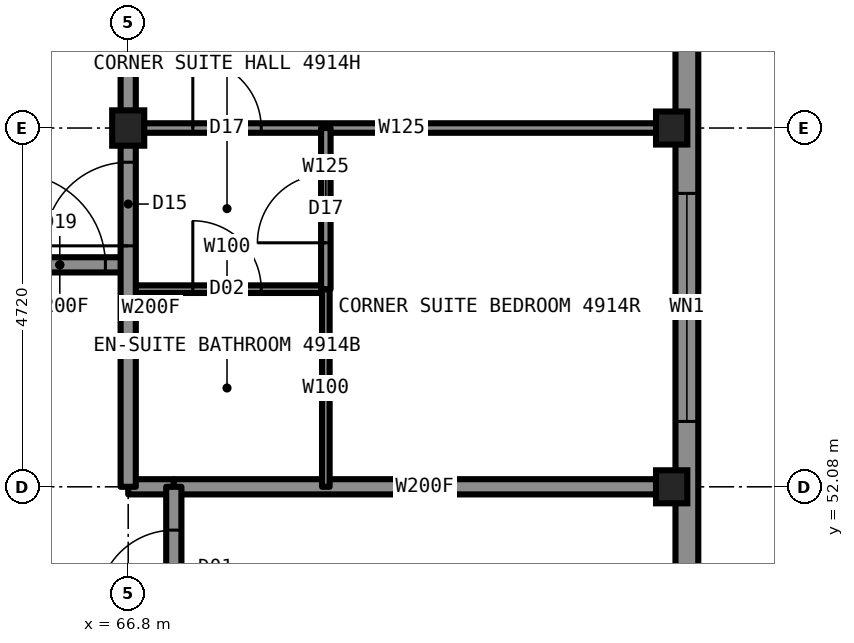
"""IFC4 building model, lengths in metres.
Left out: names, types, materials, properties, quantities, classifications, styles, units other than length and angle.
Written with IfcOpenShell. Run it as: python <this file> out.ifc"""

import sys

from ifc_helpers import new_model, si_unit, direction, frame, frame_2d, origin, origin_2d, place, context, subcontext, project, spatial, rectangle, i_section, extrude, element, fill, save


model = new_model("IFC4")
c1 = context("Model", 3, precision=1e-05, world=origin(), true_north=direction((0.0, 1.0)))
c2 = subcontext(c1, "Body", "Model", "MODEL_VIEW")
j1 = project(units=[si_unit("LENGTHUNIT", "METRE"), si_unit("PLANEANGLEUNIT", "RADIAN")], contexts=[c1])
p1 = place(None, origin())
s1 = spatial("IfcSite", under=j1, at=p1, CompositionType="ELEMENT")
p2 = place(p1, origin())
s2 = spatial("IfcBuilding", under=s1, at=p2, CompositionType="ELEMENT")
p3 = place(p2, frame((0.0, 0.0, 182.8)))
s3 = spatial("IfcBuildingStorey", under=s2, at=p3, CompositionType="ELEMENT", Elevation=182.8)
for number, where, z_axis, x_axis in (
    (1, (73.95, 52.08, 0.0), (0.0, 0.0, 1.0), (1.0, 0.0, 0.0)),
    (2, (73.95, 56.8, 0.0), (0.0, 0.0, 1.0), (1.0, 0.0, 0.0)),
):
    element("IfcColumn", number, at=place(p3, frame(where, z_axis=z_axis, x_axis=x_axis)), inside=s3, PredefinedType="COLUMN", context=c2, shape_type="SweptSolid", body=[
        extrude(i_section(OverallWidth=0.411, OverallDepth=0.434, WebThickness=0.036, FlangeThickness=0.057, at=origin_2d()), origin(), (0.0, 0.0, 1.0), 3.5),
    ])
p4 = place(p3, frame((66.8, 56.8, 0.0), z_axis=(0.0, 0.0, 1.0), x_axis=(1.0, 0.0, 0.0)))
e3 = element("IfcColumn", 3, at=p4, inside=s3, PredefinedType="COLUMN", context=c2, shape_type="SweptSolid", body=[
    extrude(i_section(OverallWidth=0.422, OverallDepth=0.465, WebThickness=0.045, FlangeThickness=0.073, at=origin_2d()), origin(), (0.0, 0.0, 1.0), 3.5),
])
p5 = place(p3, frame((65.0, 55.0, 0.0), z_axis=(0.0, 0.0, 1.0), x_axis=(1.0, 0.0, 0.0)))
e4 = element("IfcWall", 4, at=p5, inside=s3, PredefinedType="PARTITIONING", context=c2, shape_type="SweptSolid", body=[
    extrude(rectangle(XDim=1.8, YDim=0.2, at=frame_2d((0.9, 0.0))), origin(), (0.0, 0.0, 1.0), 3.33),
])
p6 = place(p5, frame((0.3, 0.0, 0.0)))
e5 = element("IfcOpeningElement", 5, at=p6, cuts=e4, PredefinedType="OPENING", context=c2, shape_type="SweptSolid", body=[
    extrude(rectangle(XDim=1.2, YDim=2.2, at=frame_2d((0.6, 1.1))), frame((0.0, 0.11, 0.0), z_axis=(0.0, -1.0, 0.0), x_axis=(1.0, 0.0, 0.0)), (0.0, 0.0, 1.0), 0.22),
])
p7 = place(p3, frame((66.8, 56.8, 0.0), z_axis=(0.0, 0.0, 1.0), x_axis=(1.0, 0.0, 0.0)))
e6 = element("IfcWall", 6, at=p7, inside=s3, PredefinedType="PARTITIONING", context=c2, shape_type="SweptSolid", body=[
    extrude(rectangle(XDim=7.2, YDim=0.125, at=frame_2d((3.6, 0.0))), origin(), (0.0, 0.0, 1.0), 2.573),
])
p8 = place(p7, frame((0.85, 0.0, 0.0)))
e7 = element("IfcOpeningElement", 7, at=p8, cuts=e6, PredefinedType="OPENING", context=c2, shape_type="SweptSolid", body=[
    extrude(rectangle(XDim=0.9, YDim=2.2, at=frame_2d((0.45, 1.1))), frame((0.0, 0.073, 0.0), z_axis=(0.0, -1.0, 0.0), x_axis=(1.0, 0.0, 0.0)), (0.0, 0.0, 1.0), 0.145),
])
p9 = place(p3, frame((66.8, 52.08, 0.0), z_axis=(0.0, 0.0, 1.0), x_axis=(1.0, 0.0, 0.0)))
e8 = element("IfcWall", 8, at=p9, inside=s3, PredefinedType="PARTITIONING", context=c2, shape_type="SweptSolid", body=[
    extrude(rectangle(XDim=0.6, YDim=0.2, at=frame_2d((0.3, 0.0))), origin(), (0.0, 0.0, 1.0), 2.573),
])
p10 = place(p3, frame((67.4, 52.08, 0.0), z_axis=(0.0, 0.0, 1.0), x_axis=(1.0, 0.0, 0.0)))
e9 = element("IfcWall", 9, at=p10, inside=s3, PredefinedType="PARTITIONING", context=c2, shape_type="SweptSolid", body=[
    extrude(rectangle(XDim=6.6, YDim=0.2, at=frame_2d((3.3, 0.0))), origin(), (0.0, 0.0, 1.0), 2.573),
])
p11 = place(p3, frame((66.8, 54.68, 0.0), z_axis=(0.0, 0.0, 1.0), x_axis=(1.0, 0.0, 0.0)))
e10 = element("IfcWall", 10, at=p11, inside=s3, PredefinedType="PARTITIONING", context=c2, shape_type="SweptSolid", body=[
    extrude(rectangle(XDim=2.6, YDim=0.1, at=frame_2d((1.3, 0.0))), origin(), (0.0, 0.0, 1.0), 3.33),
])
p12 = place(p11, frame((0.85, 0.0, 0.0)))
e11 = element("IfcOpeningElement", 11, at=p12, cuts=e10, PredefinedType="OPENING", context=c2, shape_type="SweptSolid", body=[
    extrude(rectangle(XDim=0.9, YDim=2.1, at=frame_2d((0.45, 1.05))), frame((0.0, 0.06, 0.0), z_axis=(0.0, -1.0, 0.0), x_axis=(1.0, 0.0, 0.0)), (0.0, 0.0, 1.0), 0.12),
])
p13 = place(p3, frame((66.8, 52.08, 0.0), z_axis=(0.0, 0.0, 1.0), x_axis=(0.0, 1.0, 0.0)))
e12 = element("IfcWall", 12, at=p13, inside=s3, PredefinedType="PARTITIONING", context=c2, shape_type="SweptSolid", body=[
    extrude(rectangle(XDim=4.7, YDim=0.2, at=frame_2d((2.35, 0.0))), origin(), (0.0, 0.0, 1.0), 3.33),
])
p14 = place(p13, frame((3.17, 0.0, 0.0)))
e13 = element("IfcOpeningElement", 13, at=p14, cuts=e12, PredefinedType="OPENING", context=c2, shape_type="SweptSolid", body=[
    extrude(rectangle(XDim=1.1, YDim=2.2, at=frame_2d((0.55, 1.1))), frame((0.0, 0.11, 0.0), z_axis=(0.0, -1.0, 0.0), x_axis=(1.0, 0.0, 0.0)), (0.0, 0.0, 1.0), 0.22),
])
p15 = place(p3, frame((67.4, 37.92, 0.0), z_axis=(0.0, 0.0, 1.0), x_axis=(0.0, 1.0, 0.0)))
e14 = element("IfcWall", 14, at=p15, inside=s3, PredefinedType="PARTITIONING", context=c2, shape_type="SweptSolid", body=[
    extrude(rectangle(XDim=14.16, YDim=0.2, at=frame_2d((7.08, 0.0))), origin(), (0.0, 0.0, 1.0), 3.33),
])
p16 = place(p15, frame((3.0, 0.0, 0.0)))
e15 = element("IfcOpeningElement", 15, at=p16, cuts=e14, PredefinedType="OPENING", context=c2, shape_type="SweptSolid", body=[
    extrude(rectangle(XDim=1.0, YDim=2.2, at=frame_2d((0.5, 1.1))), frame((0.0, 0.11, 0.0), z_axis=(0.0, -1.0, 0.0), x_axis=(1.0, 0.0, 0.0)), (0.0, 0.0, 1.0), 0.22),
])
p17 = place(p15, frame((12.59, 0.0, 0.0)))
e16 = element("IfcOpeningElement", 16, at=p17, cuts=e14, PredefinedType="OPENING", context=c2, shape_type="SweptSolid", body=[
    extrude(rectangle(XDim=1.0, YDim=2.2, at=frame_2d((0.5, 1.1))), frame((0.0, 0.11, 0.0), z_axis=(0.0, -1.0, 0.0), x_axis=(1.0, 0.0, 0.0)), (0.0, 0.0, 1.0), 0.22),
])
p18 = place(p3, frame((69.4, 52.08, 0.0), z_axis=(0.0, 0.0, 1.0), x_axis=(0.0, 1.0, 0.0)))
e17 = element("IfcWall", 17, at=p18, inside=s3, PredefinedType="PARTITIONING", context=c2, shape_type="SweptSolid", body=[
    extrude(rectangle(XDim=2.6, YDim=0.1, at=frame_2d((1.3, 0.0))), origin(), (0.0, 0.0, 1.0), 3.33),
])
p19 = place(p3, frame((69.4, 54.68, 0.0), z_axis=(0.0, 0.0, 1.0), x_axis=(0.0, 1.0, 0.0)))
e18 = element("IfcWall", 18, at=p19, inside=s3, PredefinedType="PARTITIONING", context=c2, shape_type="SweptSolid", body=[
    extrude(rectangle(XDim=2.12, YDim=0.125, at=frame_2d((1.06, 0.0))), origin(), (0.0, 0.0, 1.0), 3.33),
])
p20 = place(p19, frame((0.61, 0.0, 0.0)))
e19 = element("IfcOpeningElement", 19, at=p20, cuts=e18, PredefinedType="OPENING", context=c2, shape_type="SweptSolid", body=[
    extrude(rectangle(XDim=0.9, YDim=2.2, at=frame_2d((0.45, 1.1))), frame((0.0, 0.073, 0.0), z_axis=(0.0, -1.0, 0.0), x_axis=(1.0, 0.0, 0.0)), (0.0, 0.0, 1.0), 0.145),
])
p21 = place(p3, frame((74.15, 31.2, 0.0), z_axis=(0.0, 0.0, 1.0), x_axis=(0.0, 1.0, 0.0)))
e20 = element("IfcWall", 20, at=p21, inside=s3, PredefinedType="SOLIDWALL", context=c2, shape_type="SweptSolid", body=[
    extrude(rectangle(XDim=27.6, YDim=0.3, at=frame_2d((13.8, 0.0))), origin(), (0.0, 0.0, 1.0), 2.83),
])
p22 = place(p21, frame((2.86, 0.0, 0.3)))
e21 = element("IfcOpeningElement", 21, at=p22, cuts=e20, PredefinedType="OPENING", context=c2, shape_type="SweptSolid", body=[
    extrude(rectangle(XDim=3.0, YDim=2.0, at=frame_2d((1.5, 1.0))), frame((0.0, 0.16, 0.0), z_axis=(0.0, -1.0, 0.0), x_axis=(1.0, 0.0, 0.0)), (0.0, 0.0, 1.0), 0.32),
])
p23 = place(p21, frame((9.88, 0.0, 0.3)))
e22 = element("IfcOpeningElement", 22, at=p23, cuts=e20, PredefinedType="OPENING", context=c2, shape_type="SweptSolid", body=[
    extrude(rectangle(XDim=0.7, YDim=1.1, at=frame_2d((0.35, 0.55))), frame((0.0, 0.16, 0.0), z_axis=(0.0, -1.0, 0.0), x_axis=(1.0, 0.0, 0.0)), (0.0, 0.0, 1.0), 0.32),
])
p24 = place(p21, frame((12.3, 0.0, 0.3)))
e23 = element("IfcOpeningElement", 23, at=p24, cuts=e20, PredefinedType="OPENING", context=c2, shape_type="SweptSolid", body=[
    extrude(rectangle(XDim=3.0, YDim=2.0, at=frame_2d((1.5, 1.0))), frame((0.0, 0.16, 0.0), z_axis=(0.0, -1.0, 0.0), x_axis=(1.0, 0.0, 0.0)), (0.0, 0.0, 1.0), 0.32),
])
p25 = place(p21, frame((17.02, 0.0, 0.3)))
e24 = element("IfcOpeningElement", 24, at=p25, cuts=e20, PredefinedType="OPENING", context=c2, shape_type="SweptSolid", body=[
    extrude(rectangle(XDim=0.7, YDim=1.1, at=frame_2d((0.35, 0.55))), frame((0.0, 0.16, 0.0), z_axis=(0.0, -1.0, 0.0), x_axis=(1.0, 0.0, 0.0)), (0.0, 0.0, 1.0), 0.32),
])
p26 = place(p21, frame((21.74, 0.0, 0.3)))
e25 = element("IfcOpeningElement", 25, at=p26, cuts=e20, PredefinedType="OPENING", context=c2, shape_type="SweptSolid", body=[
    extrude(rectangle(XDim=3.0, YDim=2.0, at=frame_2d((1.5, 1.0))), frame((0.0, 0.16, 0.0), z_axis=(0.0, -1.0, 0.0), x_axis=(1.0, 0.0, 0.0)), (0.0, 0.0, 1.0), 0.32),
])
p27 = place(p3, frame((66.8, 56.78, 0.0), z_axis=(0.0, 0.0, 1.0), x_axis=(0.0, 1.0, 0.0)))
e26 = element("IfcWall", 26, at=p27, inside=s3, PredefinedType="PARTITIONING", context=c2, shape_type="SweptSolid", body=[
    extrude(rectangle(XDim=2.82, YDim=0.2, at=frame_2d((1.41, 0.0))), origin(), (0.0, 0.0, 1.0), 2.573),
])
p28 = place(p6, origin())
e27 = element("IfcDoor", 27, at=p28, inside=s3, OperationType="SINGLE_SWING_LEFT", PredefinedType="DOOR", context=c2, shape_type="SweptSolid", body=[
    extrude(rectangle(XDim=1.2, YDim=2.2, at=frame_2d((0.6, 1.1))), frame((0.0, 0.025, 0.0), z_axis=(0.0, -1.0, 0.0), x_axis=(1.0, 0.0, 0.0)), (0.0, 0.0, 1.0), 0.05),
])
fill(e5, e27)
p29 = place(p17, origin())
e28 = element("IfcDoor", 28, at=p29, inside=s3, OperationType="SINGLE_SWING_LEFT", PredefinedType="DOOR", context=c2, shape_type="SweptSolid", body=[
    extrude(rectangle(XDim=1.0, YDim=2.2, at=frame_2d((0.5, 1.1))), frame((0.0, 0.025, 0.0), z_axis=(0.0, -1.0, 0.0), x_axis=(1.0, 0.0, 0.0)), (0.0, 0.0, 1.0), 0.05),
])
fill(e16, e28)
p30 = place(p8, origin())
e29 = element("IfcDoor", 29, at=p30, inside=s3, OperationType="SINGLE_SWING_LEFT", PredefinedType="DOOR", context=c2, shape_type="SweptSolid", body=[
    extrude(rectangle(XDim=0.9, YDim=2.2, at=frame_2d((0.45, 1.1))), frame((0.0, 0.025, 0.0), z_axis=(0.0, -1.0, 0.0), x_axis=(1.0, 0.0, 0.0)), (0.0, 0.0, 1.0), 0.05),
])
fill(e7, e29)
p31 = place(p12, origin())
e30 = element("IfcDoor", 30, at=p31, inside=s3, OperationType="SINGLE_SWING_RIGHT", PredefinedType="DOOR", context=c2, shape_type="SweptSolid", body=[
    extrude(rectangle(XDim=0.9, YDim=2.1, at=frame_2d((0.45, 1.05))), frame((0.0, 0.025, 0.0), z_axis=(0.0, -1.0, 0.0), x_axis=(1.0, 0.0, 0.0)), (0.0, 0.0, 1.0), 0.05),
])
fill(e11, e30)
p32 = place(p14, origin())
e31 = element("IfcDoor", 31, at=p32, inside=s3, OperationType="SINGLE_SWING_LEFT", PredefinedType="DOOR", context=c2, shape_type="SweptSolid", body=[
    extrude(rectangle(XDim=1.1, YDim=2.2, at=frame_2d((0.55, 1.1))), frame((0.0, 0.025, 0.0), z_axis=(0.0, -1.0, 0.0), x_axis=(1.0, 0.0, 0.0)), (0.0, 0.0, 1.0), 0.05),
])
fill(e13, e31)
p33 = place(p20, origin())
e32 = element("IfcDoor", 32, at=p33, inside=s3, OperationType="SINGLE_SWING_LEFT", PredefinedType="DOOR", context=c2, shape_type="SweptSolid", body=[
    extrude(rectangle(XDim=0.9, YDim=2.2, at=frame_2d((0.45, 1.1))), frame((0.0, 0.025, 0.0), z_axis=(0.0, -1.0, 0.0), x_axis=(1.0, 0.0, 0.0)), (0.0, 0.0, 1.0), 0.05),
])
fill(e19, e32)
p34 = place(p26, origin())
e33 = element("IfcWindow", 33, at=p34, inside=s3, PartitioningType="SINGLE_PANEL", PredefinedType="WINDOW", context=c2, shape_type="SweptSolid", body=[
    extrude(rectangle(XDim=3.0, YDim=2.0, at=frame_2d((1.5, 1.0))), frame((0.0, 0.13, 0.0), z_axis=(0.0, -1.0, 0.0), x_axis=(1.0, 0.0, 0.0)), (0.0, 0.0, 1.0), 0.06),
])
fill(e25, e33)
save(model, sys.argv[1])
